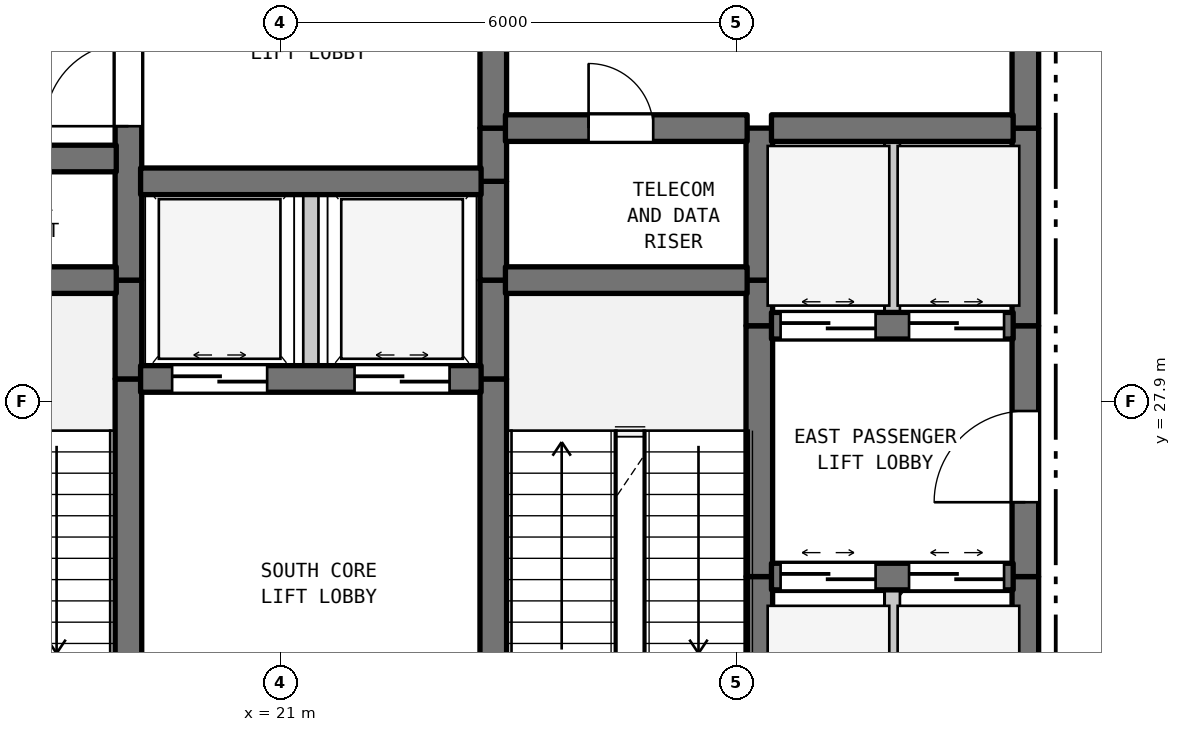
"""IFC4 building model, lengths in metres.
Left out: names, types, materials, properties, quantities, classifications, styles, units other than length and angle.
Written with IfcOpenShell. Run it as: python <this file> out.ifc"""

import sys

from ifc_helpers import new_model, si_unit, direction, frame, frame_2d, origin, place, context, subcontext, project, spatial, rectangle, extrude, element, fill, save


model = new_model("IFC4")
c1 = context("Model", 3, precision=1e-05, world=origin(), true_north=direction((0.0, 1.0)))
c2 = subcontext(c1, "Body", "Model", "MODEL_VIEW")
j1 = project(units=[si_unit("LENGTHUNIT", "METRE"), si_unit("PLANEANGLEUNIT", "RADIAN")], contexts=[c1])
p1 = place(None, origin())
s1 = spatial("IfcSite", under=j1, at=p1, CompositionType="ELEMENT")
p2 = place(p1, origin())
s2 = spatial("IfcBuilding", under=s1, at=p2, CompositionType="ELEMENT")
p3 = place(p2, frame((0.0, 0.0, 164.6)))
s3 = spatial("IfcBuildingStorey", under=s2, at=p3, CompositionType="ELEMENT", Elevation=164.6)
p4 = place(p3, frame((19.0, 22.7, 0.0), z_axis=(0.0, 0.0, 1.0), x_axis=(0.0, 1.0, 0.0)))
e1 = element("IfcWall", 1, at=p4, inside=s3, PredefinedType="SHEAR", context=c2, shape_type="SweptSolid", body=[
    extrude(rectangle(XDim=5.5, YDim=0.35, at=frame_2d((2.75, 0.0))), origin(), (0.0, 0.0, 1.0), 4.19),
])
p5 = place(p4, frame((0.631, 0.0, 0.0)))
e2 = element("IfcOpeningElement", 2, at=p5, cuts=e1, PredefinedType="OPENING", context=c2, shape_type="SweptSolid", body=[
    extrude(rectangle(XDim=1.1, YDim=2.15, at=frame_2d((0.55, 1.075))), frame((0.0, 0.185, 0.0), z_axis=(0.0, -1.0, 0.0), x_axis=(1.0, 0.0, 0.0)), (0.0, 0.0, 1.0), 0.37),
])
p6 = place(p3, frame((19.0, 28.2, 0.0), z_axis=(0.0, 0.0, 1.0), x_axis=(0.0, 1.0, 0.0)))
e3 = element("IfcWall", 3, at=p6, inside=s3, PredefinedType="SHEAR", context=c2, shape_type="SweptSolid", body=[
    extrude(rectangle(XDim=1.3, YDim=0.35, at=frame_2d((0.65, 0.0))), origin(), (0.0, 0.0, 1.0), 4.19),
])
p7 = place(p3, frame((19.0, 29.5, 0.0), z_axis=(0.0, 0.0, 1.0), x_axis=(0.0, 1.0, 0.0)))
e4 = element("IfcWall", 4, at=p7, inside=s3, PredefinedType="SHEAR", context=c2, shape_type="SweptSolid", body=[
    extrude(rectangle(XDim=5.5, YDim=0.35, at=frame_2d((2.75, 0.0))), origin(), (0.0, 0.0, 1.0), 4.19),
])
p8 = place(p7, frame((2.025, 0.0, 0.0)))
e5 = element("IfcOpeningElement", 5, at=p8, cuts=e4, PredefinedType="OPENING", context=c2, shape_type="SweptSolid", body=[
    extrude(rectangle(XDim=1.1, YDim=2.15, at=frame_2d((0.55, 1.075))), frame((0.0, 0.185, 0.0), z_axis=(0.0, -1.0, 0.0), x_axis=(1.0, 0.0, 0.0)), (0.0, 0.0, 1.0), 0.37),
])
p9 = place(p3, frame((21.4, 28.2, 0.0), z_axis=(0.0, 0.0, 1.0), x_axis=(0.0, 1.0, 0.0)))
e6 = element("IfcWall", 6, at=p9, inside=s3, PredefinedType="STANDARD", context=c2, shape_type="SweptSolid", body=[
    extrude(rectangle(XDim=2.6, YDim=0.2, at=frame_2d((1.3, 0.0))), origin(), (0.0, 0.0, 1.0), 4.19),
])
p10 = place(p3, frame((23.8, 22.7, 0.0), z_axis=(0.0, 0.0, 1.0), x_axis=(0.0, 1.0, 0.0)))
e7 = element("IfcWall", 7, at=p10, inside=s3, PredefinedType="SHEAR", context=c2, shape_type="SweptSolid", body=[
    extrude(rectangle(XDim=5.5, YDim=0.35, at=frame_2d((2.75, 0.0))), origin(), (0.0, 0.0, 1.0), 4.19),
])
p11 = place(p10, frame((0.235, 0.0, 0.0)))
e8 = element("IfcOpeningElement", 8, at=p11, cuts=e7, PredefinedType="OPENING", context=c2, shape_type="SweptSolid", body=[
    extrude(rectangle(XDim=1.1, YDim=2.15, at=frame_2d((0.55, 1.075))), frame((0.0, 0.185, 0.0), z_axis=(0.0, -1.0, 0.0), x_axis=(1.0, 0.0, 0.0)), (0.0, 0.0, 1.0), 0.37),
])
for number, where, z_axis, x_axis in (
    (9, (23.8, 28.2, 0.0), (0.0, 0.0, 1.0), (0.0, 1.0, 0.0)),
    (10, (23.8, 29.5, 0.0), (0.0, 0.0, 1.0), (0.0, 1.0, 0.0)),
):
    element("IfcWall", number, at=place(p3, frame(where, z_axis=z_axis, x_axis=x_axis)), inside=s3, PredefinedType="SHEAR", context=c2, shape_type="SweptSolid", body=[
        extrude(rectangle(XDim=1.3, YDim=0.35, at=frame_2d((0.65, 0.0))), origin(), (0.0, 0.0, 1.0), 4.19),
    ])
p12 = place(p3, frame((23.8, 30.8, 0.0), z_axis=(0.0, 0.0, 1.0), x_axis=(0.0, 1.0, 0.0)))
e11 = element("IfcWall", 11, at=p12, inside=s3, PredefinedType="SHEAR", context=c2, shape_type="SweptSolid", body=[
    extrude(rectangle(XDim=0.7, YDim=0.35, at=frame_2d((0.35, 0.0))), origin(), (0.0, 0.0, 1.0), 4.19),
])
p13 = place(p3, frame((23.8, 31.5, 0.0), z_axis=(0.0, 0.0, 1.0), x_axis=(0.0, 1.0, 0.0)))
e12 = element("IfcWall", 12, at=p13, inside=s3, PredefinedType="SHEAR", context=c2, shape_type="SweptSolid", body=[
    extrude(rectangle(XDim=3.5, YDim=0.35, at=frame_2d((1.75, 0.0))), origin(), (0.0, 0.0, 1.0), 4.19),
])
p14 = place(p13, frame((1.127, 0.0, 0.0)))
e13 = element("IfcOpeningElement", 13, at=p14, cuts=e12, PredefinedType="OPENING", context=c2, shape_type="SweptSolid", body=[
    extrude(rectangle(XDim=1.1, YDim=2.15, at=frame_2d((0.55, 1.075))), frame((0.0, 0.185, 0.0), z_axis=(0.0, -1.0, 0.0), x_axis=(1.0, 0.0, 0.0)), (0.0, 0.0, 1.0), 0.37),
])
p15 = place(p3, frame((27.3, 22.7, 0.0), z_axis=(0.0, 0.0, 1.0), x_axis=(0.0, 1.0, 0.0)))
e14 = element("IfcWall", 14, at=p15, inside=s3, PredefinedType="SHEAR", context=c2, shape_type="SweptSolid", body=[
    extrude(rectangle(XDim=2.9, YDim=0.35, at=frame_2d((1.45, 0.0))), origin(), (0.0, 0.0, 1.0), 4.19),
])
p16 = place(p3, frame((27.3, 25.6, 0.0), z_axis=(0.0, 0.0, 1.0), x_axis=(0.0, 1.0, 0.0)))
e15 = element("IfcWall", 15, at=p16, inside=s3, PredefinedType="SHEAR", context=c2, shape_type="SweptSolid", body=[
    extrude(rectangle(XDim=3.3, YDim=0.35, at=frame_2d((1.65, 0.0))), origin(), (0.0, 0.0, 1.0), 4.19),
])
p17 = place(p3, frame((27.3, 28.9, 0.0), z_axis=(0.0, 0.0, 1.0), x_axis=(0.0, 1.0, 0.0)))
e16 = element("IfcWall", 16, at=p17, inside=s3, PredefinedType="SHEAR", context=c2, shape_type="SweptSolid", body=[
    extrude(rectangle(XDim=0.6, YDim=0.35, at=frame_2d((0.3, 0.0))), origin(), (0.0, 0.0, 1.0), 4.19),
])
p18 = place(p3, frame((27.3, 29.5, 0.0), z_axis=(0.0, 0.0, 1.0), x_axis=(0.0, 1.0, 0.0)))
e17 = element("IfcWall", 17, at=p18, inside=s3, PredefinedType="SHEAR", context=c2, shape_type="SweptSolid", body=[
    extrude(rectangle(XDim=2.0, YDim=0.35, at=frame_2d((1.0, 0.0))), origin(), (0.0, 0.0, 1.0), 4.19),
])
p19 = place(p3, frame((29.05, 22.7, 0.0), z_axis=(0.0, 0.0, 1.0), x_axis=(0.0, 1.0, 0.0)))
e18 = element("IfcWall", 18, at=p19, inside=s3, PredefinedType="STANDARD", context=c2, shape_type="SweptSolid", body=[
    extrude(rectangle(XDim=2.9, YDim=0.2, at=frame_2d((1.45, 0.0))), origin(), (0.0, 0.0, 1.0), 4.19),
])
p20 = place(p3, frame((29.05, 28.9, 0.0), z_axis=(0.0, 0.0, 1.0), x_axis=(0.0, 1.0, 0.0)))
e19 = element("IfcWall", 19, at=p20, inside=s3, PredefinedType="STANDARD", context=c2, shape_type="SweptSolid", body=[
    extrude(rectangle(XDim=2.6, YDim=0.2, at=frame_2d((1.3, 0.0))), origin(), (0.0, 0.0, 1.0), 4.19),
])
p21 = place(p3, frame((30.8, 22.7, 0.0), z_axis=(0.0, 0.0, 1.0), x_axis=(0.0, 1.0, 0.0)))
e20 = element("IfcWall", 20, at=p21, inside=s3, PredefinedType="SHEAR", context=c2, shape_type="SweptSolid", body=[
    extrude(rectangle(XDim=2.9, YDim=0.35, at=frame_2d((1.45, 0.0))), origin(), (0.0, 0.0, 1.0), 4.19),
])
p22 = place(p3, frame((30.8, 25.6, 0.0), z_axis=(0.0, 0.0, 1.0), x_axis=(0.0, 1.0, 0.0)))
e21 = element("IfcWall", 21, at=p22, inside=s3, PredefinedType="SHEAR", context=c2, shape_type="SweptSolid", body=[
    extrude(rectangle(XDim=3.3, YDim=0.35, at=frame_2d((1.65, 0.0))), origin(), (0.0, 0.0, 1.0), 4.19),
])
p23 = place(p22, frame((0.978, 0.0, 0.0)))
e22 = element("IfcOpeningElement", 22, at=p23, cuts=e21, PredefinedType="OPENING", context=c2, shape_type="SweptSolid", body=[
    extrude(rectangle(XDim=1.2, YDim=2.2, at=frame_2d((0.6, 1.1))), frame((0.0, 0.185, 0.0), z_axis=(0.0, -1.0, 0.0), x_axis=(1.0, 0.0, 0.0)), (0.0, 0.0, 1.0), 0.37),
])
p24 = place(p3, frame((30.8, 28.9, 0.0), z_axis=(0.0, 0.0, 1.0), x_axis=(0.0, 1.0, 0.0)))
e23 = element("IfcWall", 23, at=p24, inside=s3, PredefinedType="SHEAR", context=c2, shape_type="SweptSolid", body=[
    extrude(rectangle(XDim=2.6, YDim=0.35, at=frame_2d((1.3, 0.0))), origin(), (0.0, 0.0, 1.0), 4.19),
])
p25 = place(p3, frame((30.8, 31.5, 0.0), z_axis=(0.0, 0.0, 1.0), x_axis=(0.0, 1.0, 0.0)))
e24 = element("IfcWall", 24, at=p25, inside=s3, PredefinedType="SHEAR", context=c2, shape_type="SweptSolid", body=[
    extrude(rectangle(XDim=3.5, YDim=0.35, at=frame_2d((1.75, 0.0))), origin(), (0.0, 0.0, 1.0), 4.19),
])
p26 = place(p25, frame((1.15, 0.0, 0.0)))
e25 = element("IfcOpeningElement", 25, at=p26, cuts=e24, PredefinedType="OPENING", context=c2, shape_type="SweptSolid", body=[
    extrude(rectangle(XDim=1.2, YDim=2.2, at=frame_2d((0.6, 1.1))), frame((0.0, 0.185, 0.0), z_axis=(0.0, -1.0, 0.0), x_axis=(1.0, 0.0, 0.0)), (0.0, 0.0, 1.0), 0.37),
])
p27 = place(p3, frame((27.46, 25.6, 0.0), z_axis=(0.0, 0.0, 1.0), x_axis=(1.0, 0.0, 0.0)))
e26 = element("IfcWall", 26, at=p27, inside=s3, PredefinedType="SHEAR", context=c2, shape_type="SweptSolid", body=[
    extrude(rectangle(XDim=3.18, YDim=0.35, at=frame_2d((1.59, 0.0))), origin(), (0.0, 0.0, 1.0), 4.19),
])
p28 = place(p27, frame((0.12, 0.0, 0.0)))
e27 = element("IfcOpeningElement", 27, at=p28, cuts=e26, PredefinedType="OPENING", context=c2, shape_type="SweptSolid", body=[
    extrude(rectangle(XDim=1.25, YDim=2.2, at=frame_2d((0.625, 1.1))), frame((0.0, 0.185, 0.0), z_axis=(0.0, -1.0, 0.0), x_axis=(1.0, 0.0, 0.0)), (0.0, 0.0, 1.0), 0.37),
])
p29 = place(p27, frame((1.81, 0.0, 0.0)))
e28 = element("IfcOpeningElement", 28, at=p29, cuts=e26, PredefinedType="OPENING", context=c2, shape_type="SweptSolid", body=[
    extrude(rectangle(XDim=1.25, YDim=2.2, at=frame_2d((0.625, 1.1))), frame((0.0, 0.185, 0.0), z_axis=(0.0, -1.0, 0.0), x_axis=(1.0, 0.0, 0.0)), (0.0, 0.0, 1.0), 0.37),
])
p30 = place(p3, frame((19.16, 28.2, 0.0), z_axis=(0.0, 0.0, 1.0), x_axis=(1.0, 0.0, 0.0)))
e29 = element("IfcWall", 29, at=p30, inside=s3, PredefinedType="SHEAR", context=c2, shape_type="SweptSolid", body=[
    extrude(rectangle(XDim=4.48, YDim=0.35, at=frame_2d((2.24, 0.0))), origin(), (0.0, 0.0, 1.0), 4.19),
])
p31 = place(p30, frame((0.415, 0.0, 0.0)))
e30 = element("IfcOpeningElement", 30, at=p31, cuts=e29, PredefinedType="OPENING", context=c2, shape_type="SweptSolid", body=[
    extrude(rectangle(XDim=1.25, YDim=2.2, at=frame_2d((0.625, 1.1))), frame((0.0, 0.185, 0.0), z_axis=(0.0, -1.0, 0.0), x_axis=(1.0, 0.0, 0.0)), (0.0, 0.0, 1.0), 0.37),
])
p32 = place(p30, frame((2.815, 0.0, 0.0)))
e31 = element("IfcOpeningElement", 31, at=p32, cuts=e29, PredefinedType="OPENING", context=c2, shape_type="SweptSolid", body=[
    extrude(rectangle(XDim=1.25, YDim=2.2, at=frame_2d((0.625, 1.1))), frame((0.0, 0.185, 0.0), z_axis=(0.0, -1.0, 0.0), x_axis=(1.0, 0.0, 0.0)), (0.0, 0.0, 1.0), 0.37),
])
p33 = place(p3, frame((27.46, 28.9, 0.0), z_axis=(0.0, 0.0, 1.0), x_axis=(1.0, 0.0, 0.0)))
e32 = element("IfcWall", 32, at=p33, inside=s3, PredefinedType="SHEAR", context=c2, shape_type="SweptSolid", body=[
    extrude(rectangle(XDim=3.18, YDim=0.35, at=frame_2d((1.59, 0.0))), origin(), (0.0, 0.0, 1.0), 4.19),
])
p34 = place(p33, frame((0.12, 0.0, 0.0)))
e33 = element("IfcOpeningElement", 33, at=p34, cuts=e32, PredefinedType="OPENING", context=c2, shape_type="SweptSolid", body=[
    extrude(rectangle(XDim=1.25, YDim=2.2, at=frame_2d((0.625, 1.1))), frame((0.0, 0.185, 0.0), z_axis=(0.0, -1.0, 0.0), x_axis=(1.0, 0.0, 0.0)), (0.0, 0.0, 1.0), 0.37),
])
p35 = place(p33, frame((1.81, 0.0, 0.0)))
e34 = element("IfcOpeningElement", 34, at=p35, cuts=e32, PredefinedType="OPENING", context=c2, shape_type="SweptSolid", body=[
    extrude(rectangle(XDim=1.25, YDim=2.2, at=frame_2d((0.625, 1.1))), frame((0.0, 0.185, 0.0), z_axis=(0.0, -1.0, 0.0), x_axis=(1.0, 0.0, 0.0)), (0.0, 0.0, 1.0), 0.37),
])
p36 = place(p3, frame((15.16, 29.5, 0.0), z_axis=(0.0, 0.0, 1.0), x_axis=(1.0, 0.0, 0.0)))
e35 = element("IfcWall", 35, at=p36, inside=s3, PredefinedType="SHEAR", context=c2, shape_type="SweptSolid", body=[
    extrude(rectangle(XDim=3.68, YDim=0.35, at=frame_2d((1.84, 0.0))), origin(), (0.0, 0.0, 1.0), 4.19),
])
p37 = place(p3, frame((23.96, 29.5, 0.0), z_axis=(0.0, 0.0, 1.0), x_axis=(1.0, 0.0, 0.0)))
e36 = element("IfcWall", 36, at=p37, inside=s3, PredefinedType="SHEAR", context=c2, shape_type="SweptSolid", body=[
    extrude(rectangle(XDim=3.18, YDim=0.35, at=frame_2d((1.59, 0.0))), origin(), (0.0, 0.0, 1.0), 4.19),
])
p38 = place(p3, frame((19.16, 30.8, 0.0), z_axis=(0.0, 0.0, 1.0), x_axis=(1.0, 0.0, 0.0)))
e37 = element("IfcWall", 37, at=p38, inside=s3, PredefinedType="SHEAR", context=c2, shape_type="SweptSolid", body=[
    extrude(rectangle(XDim=4.48, YDim=0.35, at=frame_2d((2.24, 0.0))), origin(), (0.0, 0.0, 1.0), 4.19),
])
p39 = place(p3, frame((15.16, 31.1, 0.0), z_axis=(0.0, 0.0, 1.0), x_axis=(1.0, 0.0, 0.0)))
e38 = element("IfcWall", 38, at=p39, inside=s3, PredefinedType="SHEAR", context=c2, shape_type="SweptSolid", body=[
    extrude(rectangle(XDim=3.68, YDim=0.35, at=frame_2d((1.84, 0.0))), origin(), (0.0, 0.0, 1.0), 4.19),
])
p40 = place(p3, frame((23.96, 31.5, 0.0), z_axis=(0.0, 0.0, 1.0), x_axis=(1.0, 0.0, 0.0)))
e39 = element("IfcWall", 39, at=p40, inside=s3, PredefinedType="SHEAR", context=c2, shape_type="SweptSolid", body=[
    extrude(rectangle(XDim=3.18, YDim=0.35, at=frame_2d((1.59, 0.0))), origin(), (0.0, 0.0, 1.0), 4.19),
])
p41 = place(p40, frame((1.094, 0.0, 0.0)))
e40 = element("IfcOpeningElement", 40, at=p41, cuts=e39, PredefinedType="OPENING", context=c2, shape_type="SweptSolid", body=[
    extrude(rectangle(XDim=0.85, YDim=2.1, at=frame_2d((0.425, 1.05))), frame((0.0, 0.185, 0.0), z_axis=(0.0, -1.0, 0.0), x_axis=(1.0, 0.0, 0.0)), (0.0, 0.0, 1.0), 0.37),
])
p42 = place(p3, frame((27.46, 31.5, 0.0), z_axis=(0.0, 0.0, 1.0), x_axis=(1.0, 0.0, 0.0)))
e41 = element("IfcWall", 41, at=p42, inside=s3, PredefinedType="SHEAR", context=c2, shape_type="SweptSolid", body=[
    extrude(rectangle(XDim=3.18, YDim=0.35, at=frame_2d((1.59, 0.0))), origin(), (0.0, 0.0, 1.0), 4.19),
])
p43 = place(p8, origin())
e42 = element("IfcDoor", 42, at=p43, inside=s3, OperationType="SINGLE_SWING_LEFT", PredefinedType="DOOR", context=c2, shape_type="SweptSolid", body=[
    extrude(rectangle(XDim=1.1, YDim=2.15, at=frame_2d((0.55, 1.075))), frame((0.0, 0.025, 0.0), z_axis=(0.0, -1.0, 0.0), x_axis=(1.0, 0.0, 0.0)), (0.0, 0.0, 1.0), 0.05),
])
fill(e5, e42)
p44 = place(p23, origin())
e43 = element("IfcDoor", 43, at=p44, inside=s3, OperationType="SINGLE_SWING_LEFT", PredefinedType="DOOR", context=c2, shape_type="SweptSolid", body=[
    extrude(rectangle(XDim=1.2, YDim=2.2, at=frame_2d((0.6, 1.1))), frame((0.0, 0.025, 0.0), z_axis=(0.0, -1.0, 0.0), x_axis=(1.0, 0.0, 0.0)), (0.0, 0.0, 1.0), 0.05),
])
fill(e22, e43)
p45 = place(p28, origin())
e44 = element("IfcDoor", 44, at=p45, inside=s3, OperationType="DOUBLE_DOOR_SLIDING", PredefinedType="DOOR", context=c2, shape_type="SweptSolid", body=[
    extrude(rectangle(XDim=1.25, YDim=2.2, at=frame_2d((0.625, 1.1))), frame((0.0, 0.025, 0.0), z_axis=(0.0, -1.0, 0.0), x_axis=(1.0, 0.0, 0.0)), (0.0, 0.0, 1.0), 0.05),
])
fill(e27, e44)
p46 = place(p29, origin())
e45 = element("IfcDoor", 45, at=p46, inside=s3, OperationType="DOUBLE_DOOR_SLIDING", PredefinedType="DOOR", context=c2, shape_type="SweptSolid", body=[
    extrude(rectangle(XDim=1.25, YDim=2.2, at=frame_2d((0.625, 1.1))), frame((0.0, 0.025, 0.0), z_axis=(0.0, -1.0, 0.0), x_axis=(1.0, 0.0, 0.0)), (0.0, 0.0, 1.0), 0.05),
])
fill(e28, e45)
p47 = place(p31, origin())
e46 = element("IfcDoor", 46, at=p47, inside=s3, OperationType="DOUBLE_DOOR_SLIDING", PredefinedType="DOOR", context=c2, shape_type="SweptSolid", body=[
    extrude(rectangle(XDim=1.25, YDim=2.2, at=frame_2d((0.625, 1.1))), frame((0.0, 0.025, 0.0), z_axis=(0.0, -1.0, 0.0), x_axis=(1.0, 0.0, 0.0)), (0.0, 0.0, 1.0), 0.05),
])
fill(e30, e46)
p48 = place(p32, origin())
e47 = element("IfcDoor", 47, at=p48, inside=s3, OperationType="DOUBLE_DOOR_SLIDING", PredefinedType="DOOR", context=c2, shape_type="SweptSolid", body=[
    extrude(rectangle(XDim=1.25, YDim=2.2, at=frame_2d((0.625, 1.1))), frame((0.0, 0.025, 0.0), z_axis=(0.0, -1.0, 0.0), x_axis=(1.0, 0.0, 0.0)), (0.0, 0.0, 1.0), 0.05),
])
fill(e31, e47)
p49 = place(p34, origin())
e48 = element("IfcDoor", 48, at=p49, inside=s3, OperationType="DOUBLE_DOOR_SLIDING", PredefinedType="DOOR", context=c2, shape_type="SweptSolid", body=[
    extrude(rectangle(XDim=1.25, YDim=2.2, at=frame_2d((0.625, 1.1))), frame((0.0, 0.025, 0.0), z_axis=(0.0, -1.0, 0.0), x_axis=(1.0, 0.0, 0.0)), (0.0, 0.0, 1.0), 0.05),
])
fill(e33, e48)
p50 = place(p35, origin())
e49 = element("IfcDoor", 49, at=p50, inside=s3, OperationType="DOUBLE_DOOR_SLIDING", PredefinedType="DOOR", context=c2, shape_type="SweptSolid", body=[
    extrude(rectangle(XDim=1.25, YDim=2.2, at=frame_2d((0.625, 1.1))), frame((0.0, 0.025, 0.0), z_axis=(0.0, -1.0, 0.0), x_axis=(1.0, 0.0, 0.0)), (0.0, 0.0, 1.0), 0.05),
])
fill(e34, e49)
p51 = place(p41, origin())
e50 = element("IfcDoor", 50, at=p51, inside=s3, OperationType="SINGLE_SWING_LEFT", PredefinedType="DOOR", context=c2, shape_type="SweptSolid", body=[
    extrude(rectangle(XDim=0.85, YDim=2.1, at=frame_2d((0.425, 1.05))), frame((0.0, 0.025, 0.0), z_axis=(0.0, -1.0, 0.0), x_axis=(1.0, 0.0, 0.0)), (0.0, 0.0, 1.0), 0.05),
])
fill(e40, e50)
save(model, sys.argv[1])
